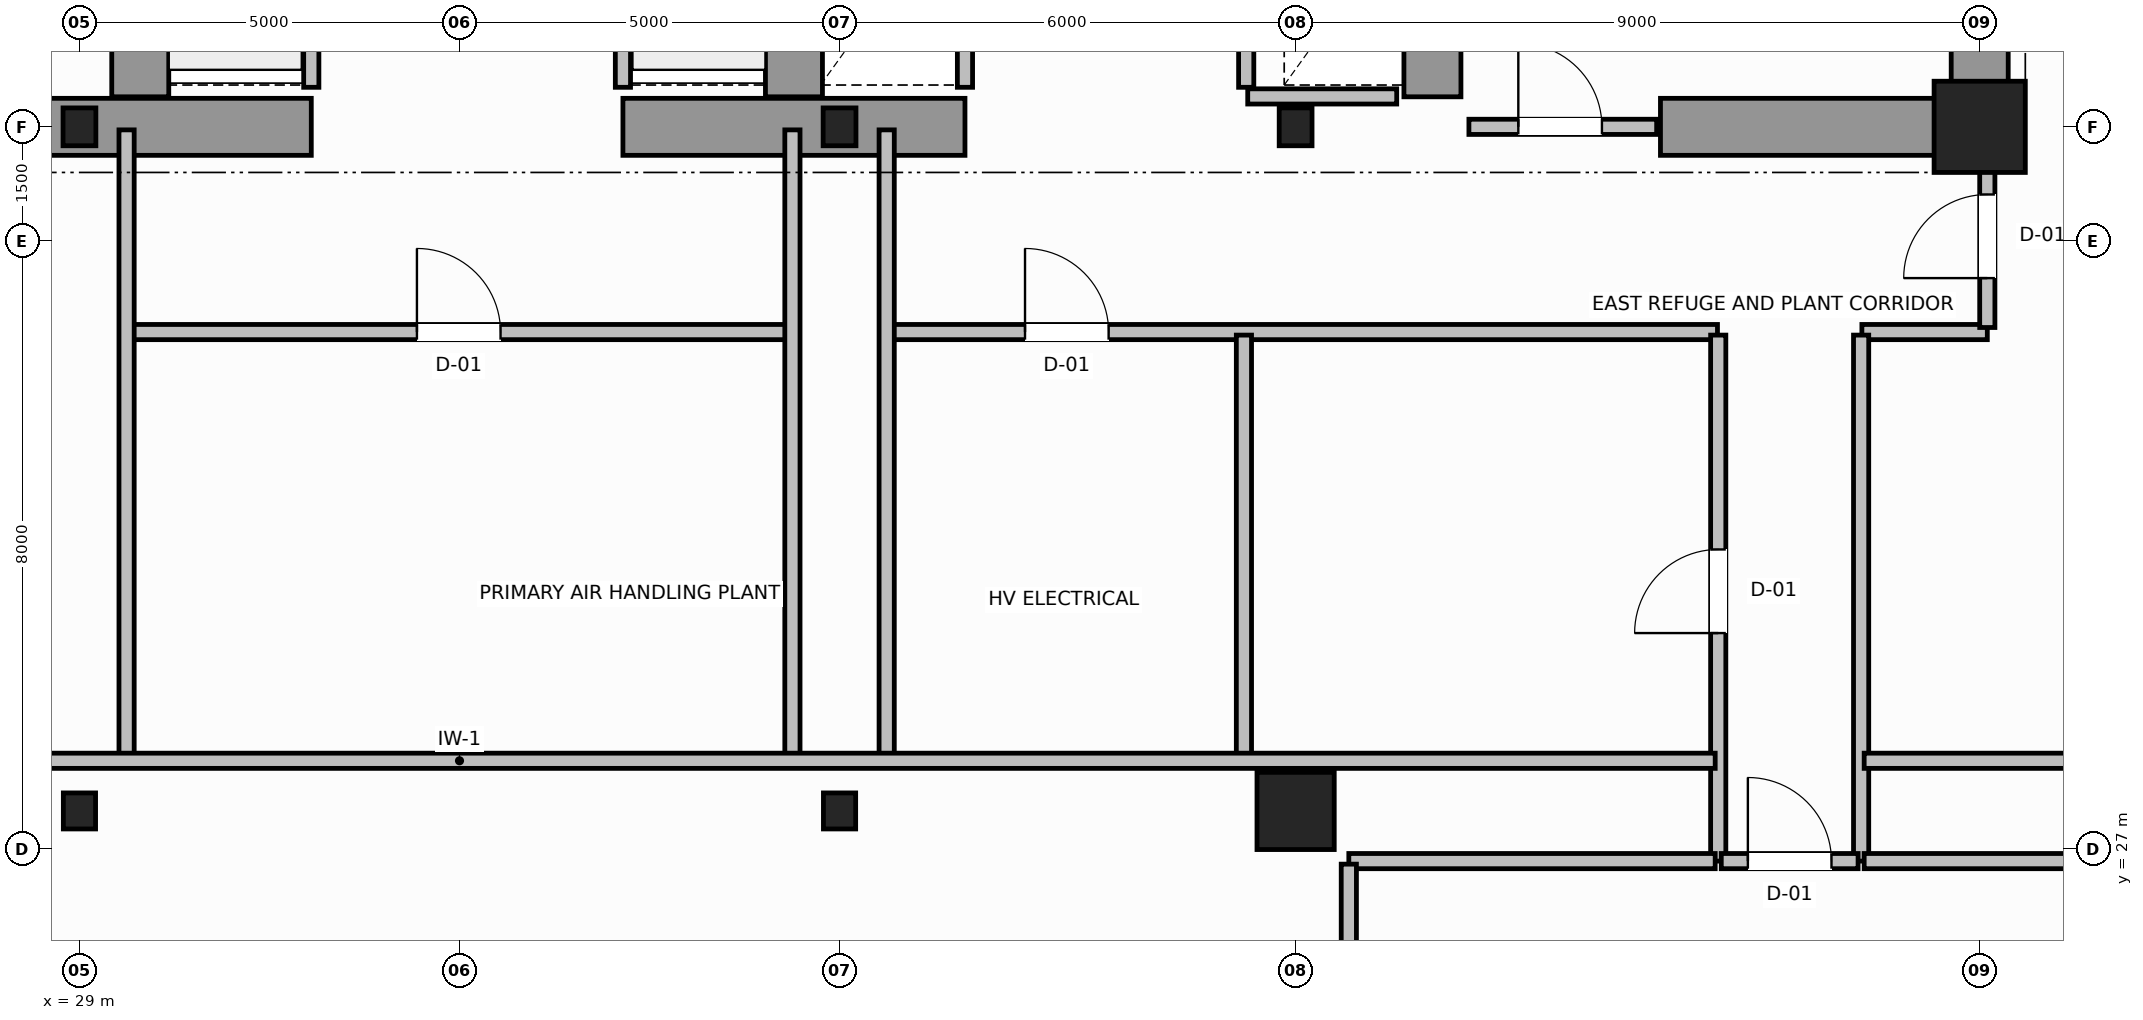
"""IFC4 building model, lengths in metres.
Left out: names, types, materials, properties, quantities, classifications, styles, units other than length and angle.
Written with IfcOpenShell. Run it as: python <this file> out.ifc"""

import sys

from ifc_helpers import new_model, si_unit, direction, frame, frame_2d, origin, origin_2d, place, context, subcontext, project, spatial, rectangle, hollow_circle, i_section, extrude, source, transform, mapped, element, fill, save


model = new_model("IFC4")
c1 = context("Model", 3, precision=1e-05, world=origin(), true_north=direction((0.0, 1.0)))
c2 = subcontext(c1, "Body", "Model", "MODEL_VIEW")
j1 = project(units=[si_unit("LENGTHUNIT", "METRE"), si_unit("PLANEANGLEUNIT", "RADIAN")], contexts=[c1])
p1 = place(None, origin())
s1 = spatial("IfcSite", under=j1, at=p1, CompositionType="ELEMENT")
p2 = place(p1, origin())
s2 = spatial("IfcBuilding", under=s1, at=p2, CompositionType="ELEMENT")
p3 = place(p2, frame((0.0, 0.0, 149.0)))
s3 = spatial("IfcBuildingStorey", under=s2, at=p3, CompositionType="ELEMENT", Elevation=149.0)
m1 = source(origin(), c2, "Body", "SweptSolid", [
    extrude(i_section(OverallWidth=0.432, OverallDepth=0.498, WebThickness=0.055, FlangeThickness=0.068, FilletRadius=0.015, at=origin_2d()), origin(), (0.0, 0.0, 1.0), 4.8),
])
for number, where, z_axis, x_axis in (
    (1, (29.0, 36.5, 0.0), (0.0, 0.0, 1.0), (1.0, 0.0, 0.0)),
    (2, (39.0, 36.5, 0.0), (0.0, 0.0, 1.0), (1.0, 0.0, 0.0)),
    (3, (45.0, 36.5, 0.0), (0.0, 0.0, 1.0), (1.0, 0.0, 0.0)),
):
    element("IfcColumn", number, at=place(p3, frame(where, z_axis=z_axis, x_axis=x_axis)), inside=s3, PredefinedType="COLUMN", context=c2, shape_type="MappedRepresentation", body=[
        mapped(m1, transform((0.0, 0.0, 0.0), scale=1.0)),
    ])
m2 = source(origin(), c2, "Body", "SweptSolid", [
    extrude(rectangle(XDim=1.2, YDim=1.2, at=origin_2d()), origin(), (0.0, 0.0, 1.0), 4.8),
])
p4 = place(p3, frame((54.0, 36.5, 0.0), z_axis=(0.0, 0.0, 1.0), x_axis=(1.0, 0.0, 0.0)))
e4 = element("IfcColumn", 4, at=p4, inside=s3, PredefinedType="COLUMN", context=c2, shape_type="MappedRepresentation", body=[
    mapped(m2, transform((0.0, 0.0, 0.0), scale=1.0)),
])
m3 = source(origin(), c2, "Body", "SweptSolid", [
    extrude(i_section(OverallWidth=0.424, OverallDepth=0.474, WebThickness=0.047, FlangeThickness=0.065, FilletRadius=0.015, at=origin_2d()), origin(), (0.0, 0.0, 1.0), 4.8),
])
for number, where, z_axis, x_axis in (
    (5, (29.0, 27.5, 0.0), (0.0, 0.0, 1.0), (1.0, 0.0, 0.0)),
    (6, (39.0, 27.5, 0.0), (0.0, 0.0, 1.0), (1.0, 0.0, 0.0)),
):
    element("IfcColumn", number, at=place(p3, frame(where, z_axis=z_axis, x_axis=x_axis)), inside=s3, PredefinedType="COLUMN", context=c2, shape_type="MappedRepresentation", body=[
        mapped(m3, transform((0.0, 0.0, 0.0), scale=1.0)),
    ])
m4 = source(origin(), c2, "Body", "SweptSolid", [
    extrude(hollow_circle(Radius=0.508, WallThickness=0.045, at=origin_2d()), origin(), (0.0, 0.0, 1.0), 4.8),
])
p5 = place(p3, frame((45.0, 27.5, 0.0), z_axis=(0.0, 0.0, 1.0), x_axis=(1.0, 0.0, 0.0)))
e7 = element("IfcColumn", 7, at=p5, inside=s3, PredefinedType="COLUMN", context=c2, shape_type="MappedRepresentation", body=[
    mapped(m4, transform((0.0, 0.0, 0.0), scale=1.0)),
])
p6 = place(p3, frame((54.0, 36.5, 0.0), z_axis=(0.0, 0.0, 1.0), x_axis=(0.0, 1.0, 0.0)))
e8 = element("IfcWall", 8, at=p6, inside=s3, PredefinedType="SHEAR", context=c2, shape_type="SweptSolid", body=[
    extrude(rectangle(XDim=14.5, YDim=0.75, at=frame_2d((7.25, 0.0))), origin(), (0.0, 0.0, 1.0), 4.8),
])
for number, where, z_axis, x_axis in (
    (9, (27.55, 36.5, 0.0), (0.0, 0.0, 1.0), (1.0, 0.0, 0.0)),
    (10, (36.15, 36.5, 0.0), (0.0, 0.0, 1.0), (1.0, 0.0, 0.0)),
):
    element("IfcWall", number, at=place(p3, frame(where, z_axis=z_axis, x_axis=x_axis)), inside=s3, PredefinedType="SHEAR", context=c2, shape_type="SweptSolid", body=[
        extrude(rectangle(XDim=4.5, YDim=0.75, at=frame_2d((2.25, 0.0))), origin(), (0.0, 0.0, 1.0), 4.8),
    ])
p7 = place(p3, frame((49.8, 36.5, 0.0), z_axis=(0.0, 0.0, 1.0), x_axis=(1.0, 0.0, 0.0)))
e11 = element("IfcWall", 11, at=p7, inside=s3, PredefinedType="SHEAR", context=c2, shape_type="SweptSolid", body=[
    extrude(rectangle(XDim=3.805, YDim=0.75, at=frame_2d((1.902, 0.0))), origin(), (0.0, 0.0, 1.0), 3.34),
])
p8 = place(p3, frame((29.8, 36.895, 0.0), z_axis=(0.0, 0.0, 1.0), x_axis=(0.0, 1.0, 0.0)))
e12 = element("IfcWall", 12, at=p8, inside=s3, PredefinedType="SHEAR", context=c2, shape_type="SweptSolid", body=[
    extrude(rectangle(XDim=9.305, YDim=0.75, at=frame_2d((4.652, 0.0))), origin(), (0.0, 0.0, 1.0), 4.8),
])
p9 = place(p8, frame((4.05, 0.0, 0.0)))
e13 = element("IfcOpeningElement", 13, at=p9, cuts=e12, PredefinedType="OPENING", context=c2, shape_type="SweptSolid", body=[
    extrude(rectangle(XDim=1.1, YDim=2.15, at=frame_2d((0.55, 1.075))), frame((0.0, 0.385, 0.0), z_axis=(0.0, -1.0, 0.0), x_axis=(1.0, 0.0, 0.0)), (0.0, 0.0, 1.0), 0.77),
])
p10 = place(p3, frame((38.4, 36.895, 0.0), z_axis=(0.0, 0.0, 1.0), x_axis=(0.0, 1.0, 0.0)))
e14 = element("IfcWall", 14, at=p10, inside=s3, PredefinedType="SHEAR", context=c2, shape_type="SweptSolid", body=[
    extrude(rectangle(XDim=9.305, YDim=0.75, at=frame_2d((4.652, 0.0))), origin(), (0.0, 0.0, 1.0), 4.8),
])
p11 = place(p10, frame((4.05, 0.0, 0.0)))
e15 = element("IfcOpeningElement", 15, at=p11, cuts=e14, PredefinedType="OPENING", context=c2, shape_type="SweptSolid", body=[
    extrude(rectangle(XDim=1.1, YDim=2.15, at=frame_2d((0.55, 1.075))), frame((0.0, 0.385, 0.0), z_axis=(0.0, -1.0, 0.0), x_axis=(1.0, 0.0, 0.0)), (0.0, 0.0, 1.0), 0.77),
])
p12 = place(p3, frame((46.8, 36.895, 0.0), z_axis=(0.0, 0.0, 1.0), x_axis=(0.0, 1.0, 0.0)))
e16 = element("IfcWall", 16, at=p12, inside=s3, PredefinedType="SHEAR", context=c2, shape_type="SweptSolid", body=[
    extrude(rectangle(XDim=9.305, YDim=0.75, at=frame_2d((4.652, 0.0))), origin(), (0.0, 0.0, 1.0), 4.8),
])
p13 = place(p3, frame((47.28, 36.5, 0.0), z_axis=(0.0, 0.0, 1.0), x_axis=(1.0, 0.0, 0.0)))
e17 = element("IfcWall", 17, at=p13, inside=s3, PredefinedType="SOLIDWALL", context=c2, shape_type="SweptSolid", body=[
    extrude(rectangle(XDim=2.47, YDim=0.2, at=frame_2d((1.235, 0.0))), origin(), (0.0, 0.0, 1.0), 3.33),
])
p14 = place(p13, frame((0.65, 0.0, 0.0)))
e18 = element("IfcOpeningElement", 18, at=p14, cuts=e17, PredefinedType="OPENING", context=c2, shape_type="SweptSolid", body=[
    extrude(rectangle(XDim=1.1, YDim=2.15, at=frame_2d((0.55, 1.075))), frame((0.0, 0.11, 0.0), z_axis=(0.0, -1.0, 0.0), x_axis=(1.0, 0.0, 0.0)), (0.0, 0.0, 1.0), 0.22),
])
for number, where, z_axis, x_axis in (
    (19, (32.05, 37.02, 0.0), (0.0, 0.0, 1.0), (0.0, 1.0, 0.0)),
    (20, (36.15, 37.02, 0.0), (0.0, 0.0, 1.0), (0.0, 1.0, 0.0)),
    (21, (40.65, 37.02, 0.0), (0.0, 0.0, 1.0), (0.0, 1.0, 0.0)),
):
    element("IfcWall", number, at=place(p3, frame(where, z_axis=z_axis, x_axis=x_axis)), inside=s3, PredefinedType="SOLIDWALL", context=c2, shape_type="SweptSolid", body=[
        extrude(rectangle(XDim=2.56, YDim=0.2, at=frame_2d((1.28, 0.0))), origin(), (0.0, 0.0, 1.0), 4.54),
    ])
p15 = place(p3, frame((44.37, 36.9, 0.0), z_axis=(0.0, 0.0, 1.0), x_axis=(1.0, 0.0, 0.0)))
e22 = element("IfcWall", 22, at=p15, inside=s3, PredefinedType="SOLIDWALL", context=c2, shape_type="SweptSolid", body=[
    extrude(rectangle(XDim=1.96, YDim=0.2, at=frame_2d((0.98, 0.0))), origin(), (0.0, 0.0, 1.0), 3.33),
])
p16 = place(p3, frame((44.35, 37.02, 0.0), z_axis=(0.0, 0.0, 1.0), x_axis=(0.0, 1.0, 0.0)))
e23 = element("IfcWall", 23, at=p16, inside=s3, PredefinedType="SOLIDWALL", context=c2, shape_type="SweptSolid", body=[
    extrude(rectangle(XDim=2.56, YDim=0.2, at=frame_2d((1.28, 0.0))), origin(), (0.0, 0.0, 1.0), 4.54),
])
p17 = place(p3, frame((29.64, 33.8, 0.0), z_axis=(0.0, 0.0, 1.0), x_axis=(1.0, 0.0, 0.0)))
e24 = element("IfcWall", 24, at=p17, inside=s3, PredefinedType="SOLIDWALL", context=c2, shape_type="SweptSolid", body=[
    extrude(rectangle(XDim=8.72, YDim=0.2, at=frame_2d((4.36, 0.0))), origin(), (0.0, 0.0, 1.0), 4.54),
])
p18 = place(p17, frame((3.8, 0.0, 0.0)))
e25 = element("IfcOpeningElement", 25, at=p18, cuts=e24, PredefinedType="OPENING", context=c2, shape_type="SweptSolid", body=[
    extrude(rectangle(XDim=1.1, YDim=2.15, at=frame_2d((0.55, 1.075))), frame((0.0, 0.11, 0.0), z_axis=(0.0, -1.0, 0.0), x_axis=(1.0, 0.0, 0.0)), (0.0, 0.0, 1.0), 0.22),
])
p19 = place(p3, frame((39.64, 33.8, 0.0), z_axis=(0.0, 0.0, 1.0), x_axis=(1.0, 0.0, 0.0)))
e26 = element("IfcWall", 26, at=p19, inside=s3, PredefinedType="SOLIDWALL", context=c2, shape_type="SweptSolid", body=[
    extrude(rectangle(XDim=10.91, YDim=0.2, at=frame_2d((5.455, 0.0))), origin(), (0.0, 0.0, 1.0), 4.54),
])
p20 = place(p19, frame((1.8, 0.0, 0.0)))
e27 = element("IfcOpeningElement", 27, at=p20, cuts=e26, PredefinedType="OPENING", context=c2, shape_type="SweptSolid", body=[
    extrude(rectangle(XDim=1.1, YDim=2.15, at=frame_2d((0.55, 1.075))), frame((0.0, 0.11, 0.0), z_axis=(0.0, -1.0, 0.0), x_axis=(1.0, 0.0, 0.0)), (0.0, 0.0, 1.0), 0.22),
])
p21 = place(p3, frame((52.45, 33.8, 0.0), z_axis=(0.0, 0.0, 1.0), x_axis=(1.0, 0.0, 0.0)))
e28 = element("IfcWall", 28, at=p21, inside=s3, PredefinedType="SOLIDWALL", context=c2, shape_type="SweptSolid", body=[
    extrude(rectangle(XDim=1.65, YDim=0.2, at=frame_2d((0.825, 0.0))), origin(), (0.0, 0.0, 1.0), 4.54),
])
p22 = place(p3, frame((54.1, 33.86, 0.0), z_axis=(0.0, 0.0, 1.0), x_axis=(0.0, 1.0, 0.0)))
e29 = element("IfcWall", 29, at=p22, inside=s3, PredefinedType="SOLIDWALL", context=c2, shape_type="SweptSolid", body=[
    extrude(rectangle(XDim=2.58, YDim=0.2, at=frame_2d((1.29, 0.0))), origin(), (0.0, 0.0, 1.0), 4.54),
])
p23 = place(p22, frame((0.65, 0.0, 0.0)))
e30 = element("IfcOpeningElement", 30, at=p23, cuts=e29, PredefinedType="OPENING", context=c2, shape_type="SweptSolid", body=[
    extrude(rectangle(XDim=1.1, YDim=2.15, at=frame_2d((0.55, 1.075))), frame((0.0, 0.11, 0.0), z_axis=(0.0, -1.0, 0.0), x_axis=(1.0, 0.0, 0.0)), (0.0, 0.0, 1.0), 0.22),
])
p24 = place(p3, frame((50.56, 26.84, 0.0), z_axis=(0.0, 0.0, 1.0), x_axis=(0.0, 1.0, 0.0)))
e31 = element("IfcWall", 31, at=p24, inside=s3, PredefinedType="SOLIDWALL", context=c2, shape_type="SweptSolid", body=[
    extrude(rectangle(XDim=6.92, YDim=0.2, at=frame_2d((3.46, 0.0))), origin(), (0.0, 0.0, 1.0), 4.54),
])
p25 = place(p24, frame((3.0, 0.0, 0.0)))
e32 = element("IfcOpeningElement", 32, at=p25, cuts=e31, PredefinedType="OPENING", context=c2, shape_type="SweptSolid", body=[
    extrude(rectangle(XDim=1.1, YDim=2.15, at=frame_2d((0.55, 1.075))), frame((0.0, 0.11, 0.0), z_axis=(0.0, -1.0, 0.0), x_axis=(1.0, 0.0, 0.0)), (0.0, 0.0, 1.0), 0.22),
])
p26 = place(p3, frame((52.44, 26.84, 0.0), z_axis=(0.0, 0.0, 1.0), x_axis=(0.0, 1.0, 0.0)))
e33 = element("IfcWall", 33, at=p26, inside=s3, PredefinedType="SOLIDWALL", context=c2, shape_type="SweptSolid", body=[
    extrude(rectangle(XDim=6.92, YDim=0.2, at=frame_2d((3.46, 0.0))), origin(), (0.0, 0.0, 1.0), 4.54),
])
p27 = place(p3, frame((50.6, 26.84, 0.0), z_axis=(0.0, 0.0, 1.0), x_axis=(1.0, 0.0, 0.0)))
e34 = element("IfcWall", 34, at=p27, inside=s3, PredefinedType="SOLIDWALL", context=c2, shape_type="SweptSolid", body=[
    extrude(rectangle(XDim=1.8, YDim=0.2, at=frame_2d((0.9, 0.0))), origin(), (0.0, 0.0, 1.0), 4.54),
])
p28 = place(p27, frame((0.35, 0.0, 0.0)))
e35 = element("IfcOpeningElement", 35, at=p28, cuts=e34, PredefinedType="OPENING", context=c2, shape_type="SweptSolid", body=[
    extrude(rectangle(XDim=1.1, YDim=2.15, at=frame_2d((0.55, 1.075))), frame((0.0, 0.11, 0.0), z_axis=(0.0, -1.0, 0.0), x_axis=(1.0, 0.0, 0.0)), (0.0, 0.0, 1.0), 0.22),
])
for number, where, z_axis, x_axis in (
    (36, (29.62, 28.16, 0.0), (0.0, 0.0, 1.0), (0.0, 1.0, 0.0)),
    (37, (38.38, 28.16, 0.0), (0.0, 0.0, 1.0), (0.0, 1.0, 0.0)),
    (38, (39.62, 28.16, 0.0), (0.0, 0.0, 1.0), (0.0, 1.0, 0.0)),
):
    element("IfcWall", number, at=place(p3, frame(where, z_axis=z_axis, x_axis=x_axis)), inside=s3, PredefinedType="SOLIDWALL", context=c2, shape_type="SweptSolid", body=[
        extrude(rectangle(XDim=8.3, YDim=0.2, at=frame_2d((4.15, 0.0))), origin(), (0.0, 0.0, 1.0), 4.54),
    ])
p29 = place(p3, frame((44.32, 28.16, 0.0), z_axis=(0.0, 0.0, 1.0), x_axis=(0.0, 1.0, 0.0)))
e39 = element("IfcWall", 39, at=p29, inside=s3, PredefinedType="SOLIDWALL", context=c2, shape_type="SweptSolid", body=[
    extrude(rectangle(XDim=5.6, YDim=0.2, at=frame_2d((2.8, 0.0))), origin(), (0.0, 0.0, 1.0), 4.54),
])
p30 = place(p3, frame((17.48, 28.16, 0.0), z_axis=(0.0, 0.0, 1.0), x_axis=(1.0, 0.0, 0.0)))
e40 = element("IfcWall", 40, at=p30, inside=s3, PredefinedType="SOLIDWALL", context=c2, shape_type="SweptSolid", body=[
    extrude(rectangle(XDim=33.04, YDim=0.2, at=frame_2d((16.52, 0.0))), origin(), (0.0, 0.0, 1.0), 4.54),
])
p31 = place(p3, frame((52.48, 28.16, 0.0), z_axis=(0.0, 0.0, 1.0), x_axis=(1.0, 0.0, 0.0)))
e41 = element("IfcWall", 41, at=p31, inside=s3, PredefinedType="SOLIDWALL", context=c2, shape_type="SweptSolid", body=[
    extrude(rectangle(XDim=6.755, YDim=0.2, at=frame_2d((3.377, 0.0))), origin(), (0.0, 0.0, 1.0), 4.54),
])
p32 = place(p3, frame((45.7, 26.84, 0.0), z_axis=(0.0, 0.0, 1.0), x_axis=(1.0, 0.0, 0.0)))
e42 = element("IfcWall", 42, at=p32, inside=s3, PredefinedType="SOLIDWALL", context=c2, shape_type="SweptSolid", body=[
    extrude(rectangle(XDim=4.82, YDim=0.2, at=frame_2d((2.41, 0.0))), origin(), (0.0, 0.0, 1.0), 4.54),
])
p33 = place(p3, frame((52.48, 26.84, 0.0), z_axis=(0.0, 0.0, 1.0), x_axis=(1.0, 0.0, 0.0)))
e43 = element("IfcWall", 43, at=p33, inside=s3, PredefinedType="SOLIDWALL", context=c2, shape_type="SweptSolid", body=[
    extrude(rectangle(XDim=6.516, YDim=0.2, at=frame_2d((3.258, 0.0))), origin(), (0.0, 0.0, 1.0), 4.54),
])
p34 = place(p3, frame((45.7, 18.62, 0.0), z_axis=(0.0, 0.0, 1.0), x_axis=(0.0, 1.0, 0.0)))
e44 = element("IfcWall", 44, at=p34, inside=s3, PredefinedType="SOLIDWALL", context=c2, shape_type="SweptSolid", body=[
    extrude(rectangle(XDim=8.18, YDim=0.2, at=frame_2d((4.09, 0.0))), origin(), (0.0, 0.0, 1.0), 4.54),
])
m5 = source(origin(), c2, "Body", "SweptSolid", [
    extrude(rectangle(XDim=1.1, YDim=2.15, at=frame_2d((0.55, 1.075))), frame((0.0, 0.025, 0.0), z_axis=(0.0, -1.0, 0.0), x_axis=(1.0, 0.0, 0.0)), (0.0, 0.0, 1.0), 0.05),
])
p35 = place(p14, origin())
e45 = element("IfcDoor", 45, at=p35, inside=s3, OperationType="SINGLE_SWING_LEFT", PredefinedType="DOOR", context=c2, shape_type="MappedRepresentation", body=[
    mapped(m5, transform((0.0, 0.0, 0.0), scale=1.0)),
])
fill(e18, e45)
p36 = place(p23, origin())
e46 = element("IfcDoor", 46, at=p36, inside=s3, OperationType="SINGLE_SWING_RIGHT", PredefinedType="DOOR", context=c2, shape_type="MappedRepresentation", body=[
    mapped(m5, transform((0.0, 0.0, 0.0), scale=1.0)),
])
fill(e30, e46)
p37 = place(p25, origin())
e47 = element("IfcDoor", 47, at=p37, inside=s3, OperationType="SINGLE_SWING_LEFT", PredefinedType="DOOR", context=c2, shape_type="MappedRepresentation", body=[
    mapped(m5, transform((0.0, 0.0, 0.0), scale=1.0)),
])
fill(e32, e47)
p38 = place(p28, origin())
e48 = element("IfcDoor", 48, at=p38, inside=s3, OperationType="SINGLE_SWING_RIGHT", PredefinedType="DOOR", context=c2, shape_type="MappedRepresentation", body=[
    mapped(m5, transform((0.0, 0.0, 0.0), scale=1.0)),
])
fill(e35, e48)
p39 = place(p18, origin())
e49 = element("IfcDoor", 49, at=p39, inside=s3, OperationType="SINGLE_SWING_RIGHT", PredefinedType="DOOR", context=c2, shape_type="MappedRepresentation", body=[
    mapped(m5, transform((0.0, 0.0, 0.0), scale=1.0)),
])
fill(e25, e49)
p40 = place(p20, origin())
e50 = element("IfcDoor", 50, at=p40, inside=s3, OperationType="SINGLE_SWING_LEFT", PredefinedType="DOOR", context=c2, shape_type="MappedRepresentation", body=[
    mapped(m5, transform((0.0, 0.0, 0.0), scale=1.0)),
])
fill(e27, e50)
save(model, sys.argv[1])
